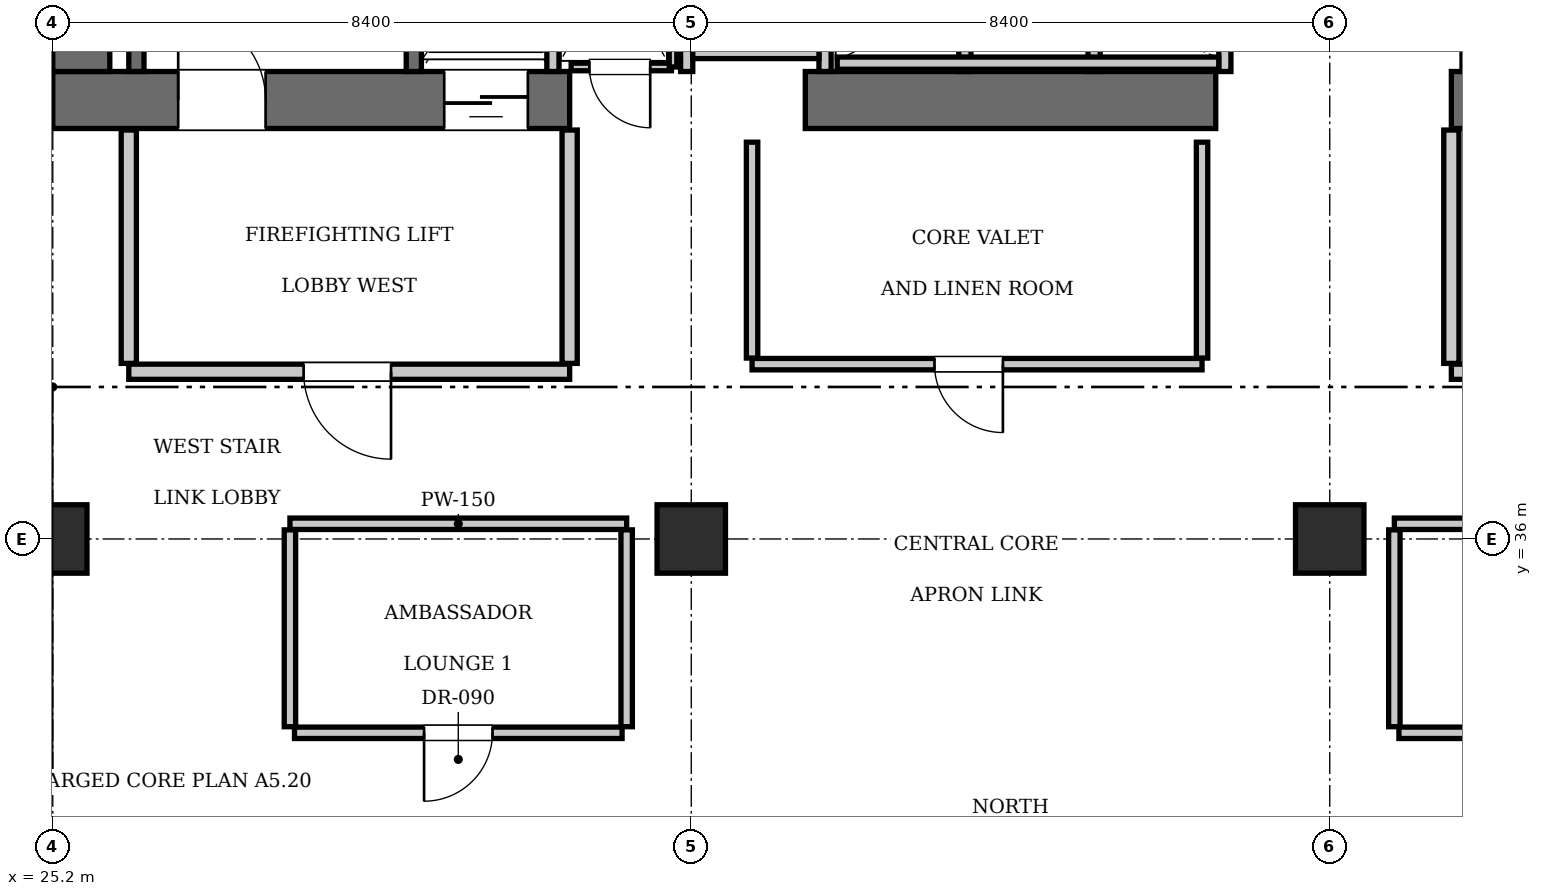
"""IFC4 building model, lengths in metres.
Left out: names, types, materials, properties, quantities, classifications, styles, units other than length and angle.
Written with IfcOpenShell. Run it as: python <this file> out.ifc"""

import sys

from ifc_helpers import new_model, si_unit, direction, frame, frame_2d, origin, origin_2d, place, context, subcontext, project, spatial, rectangle, extrude, element, fill, save


model = new_model("IFC4")
c1 = context("Model", 3, precision=1e-05, world=origin(), true_north=direction((0.0, 1.0)))
c2 = subcontext(c1, "Body", "Model", "MODEL_VIEW")
j1 = project(units=[si_unit("LENGTHUNIT", "METRE"), si_unit("PLANEANGLEUNIT", "RADIAN")], contexts=[c1])
p1 = place(None, origin())
s1 = spatial("IfcSite", under=j1, at=p1, CompositionType="ELEMENT")
p2 = place(p1, origin())
s2 = spatial("IfcBuilding", under=s1, at=p2, CompositionType="ELEMENT")
p3 = place(p2, frame((0.0, 0.0, 219.8)))
s3 = spatial("IfcBuildingStorey", under=s2, at=p3, CompositionType="ELEMENT", Elevation=219.8)
p4 = place(p3, frame((25.2, 41.775, 0.0), z_axis=(0.0, 0.0, 1.0), x_axis=(1.0, 0.0, 0.0)))
e1 = element("IfcWall", 1, at=p4, inside=s3, PredefinedType="SHEAR", context=c2, shape_type="SweptSolid", body=[
    extrude(rectangle(XDim=6.8, YDim=0.75, at=frame_2d((3.4, 0.0))), origin(), (0.0, 0.0, 1.0), 3.85),
])
p5 = place(p4, frame((1.65, 0.0, 0.0)))
e2 = element("IfcOpeningElement", 2, at=p5, cuts=e1, PredefinedType="OPENING", context=c2, shape_type="SweptSolid", body=[
    extrude(rectangle(XDim=1.15, YDim=2.15, at=frame_2d((0.575, 1.075))), frame((0.0, 0.385, 0.0), z_axis=(0.0, -1.0, 0.0), x_axis=(1.0, 0.0, 0.0)), (0.0, 0.0, 1.0), 0.77),
])
p6 = place(p4, frame((5.15, 0.0, 0.0)))
e3 = element("IfcOpeningElement", 3, at=p6, cuts=e1, PredefinedType="OPENING", context=c2, shape_type="SweptSolid", body=[
    extrude(rectangle(XDim=1.1, YDim=2.2, at=frame_2d((0.55, 1.1))), frame((0.0, 0.385, 0.0), z_axis=(0.0, -1.0, 0.0), x_axis=(1.0, 0.0, 0.0)), (0.0, 0.0, 1.0), 0.77),
])
p7 = place(p3, frame((35.1, 41.775, 0.0), z_axis=(0.0, 0.0, 1.0), x_axis=(1.0, 0.0, 0.0)))
e4 = element("IfcWall", 4, at=p7, inside=s3, PredefinedType="SHEAR", context=c2, shape_type="SweptSolid", body=[
    extrude(rectangle(XDim=5.4, YDim=0.75, at=frame_2d((2.7, 0.0))), origin(), (0.0, 0.0, 1.0), 3.85),
])
p8 = place(p3, frame((43.6, 41.775, 0.0), z_axis=(0.0, 0.0, 1.0), x_axis=(1.0, 0.0, 0.0)))
e5 = element("IfcWall", 5, at=p8, inside=s3, PredefinedType="SHEAR", context=c2, shape_type="SweptSolid", body=[
    extrude(rectangle(XDim=6.8, YDim=0.75, at=frame_2d((3.4, 0.0))), origin(), (0.0, 0.0, 1.0), 3.85),
])
p9 = place(p8, frame((3.9, 0.0, 0.0)))
e6 = element("IfcOpeningElement", 6, at=p9, cuts=e5, PredefinedType="OPENING", context=c2, shape_type="SweptSolid", body=[
    extrude(rectangle(XDim=1.15, YDim=2.15, at=frame_2d((0.575, 1.075))), frame((0.0, 0.385, 0.0), z_axis=(0.0, -1.0, 0.0), x_axis=(1.0, 0.0, 0.0)), (0.0, 0.0, 1.0), 0.77),
])
p10 = place(p8, frame((0.55, 0.0, 0.0)))
e7 = element("IfcOpeningElement", 7, at=p10, cuts=e5, PredefinedType="OPENING", context=c2, shape_type="SweptSolid", body=[
    extrude(rectangle(XDim=1.1, YDim=2.2, at=frame_2d((0.55, 1.1))), frame((0.0, 0.385, 0.0), z_axis=(0.0, -1.0, 0.0), x_axis=(1.0, 0.0, 0.0)), (0.0, 0.0, 1.0), 0.77),
])
p11 = place(p3, frame((25.575, 42.15, 0.0), z_axis=(0.0, 0.0, 1.0), x_axis=(0.0, 1.0, 0.0)))
e8 = element("IfcWall", 8, at=p11, inside=s3, PredefinedType="SHEAR", context=c2, shape_type="SweptSolid", body=[
    extrude(rectangle(XDim=1.9, YDim=0.75, at=frame_2d((0.95, 0.0))), origin(), (0.0, 0.0, 1.0), 3.85),
])
for number, where, z_axis, x_axis in (
    (9, (25.2, 36.0, 0.0), (0.0, 0.0, 1.0), (1.0, 0.0, 0.0)),
    (10, (33.6, 36.0, 0.0), (0.0, 0.0, 1.0), (1.0, 0.0, 0.0)),
    (11, (42.0, 36.0, 0.0), (0.0, 0.0, 1.0), (1.0, 0.0, 0.0)),
):
    element("IfcColumn", number, at=place(p3, frame(where, z_axis=z_axis, x_axis=x_axis)), inside=s3, PredefinedType="COLUMN", context=c2, shape_type="SweptSolid", body=[
        extrude(rectangle(XDim=0.9, YDim=0.9, at=origin_2d()), origin(), (0.0, 0.0, 1.0), 3.85),
    ])
p12 = place(p3, frame((29.95, 42.15, 0.0), z_axis=(0.0, 0.0, 1.0), x_axis=(0.0, 1.0, 0.0)))
e12 = element("IfcWall", 12, at=p12, inside=s3, PredefinedType="SOLIDWALL", context=c2, shape_type="SweptSolid", body=[
    extrude(rectangle(XDim=9.0, YDim=0.2, at=frame_2d((4.5, 0.0))), origin(), (0.0, 0.0, 1.0), 3.61),
])
p13 = place(p3, frame((26.3, 42.15, 0.0), z_axis=(0.0, 0.0, 1.0), x_axis=(0.0, 1.0, 0.0)))
e13 = element("IfcWall", 13, at=p13, inside=s3, PredefinedType="SOLIDWALL", context=c2, shape_type="SweptSolid", body=[
    extrude(rectangle(XDim=1.87, YDim=0.2, at=frame_2d((0.935, 0.0))), origin(), (0.0, 0.0, 1.0), 3.61),
])
for number, where, z_axis, x_axis in (
    (14, (31.78, 42.15, 0.0), (0.0, 0.0, 1.0), (0.0, 1.0, 0.0)),
    (15, (43.82, 42.15, 0.0), (0.0, 0.0, 1.0), (0.0, 1.0, 0.0)),
):
    element("IfcWall", number, at=place(p3, frame(where, z_axis=z_axis, x_axis=x_axis)), inside=s3, PredefinedType="SOLIDWALL", context=c2, shape_type="SweptSolid", body=[
        extrude(rectangle(XDim=2.59, YDim=0.16, at=frame_2d((1.295, 0.0))), origin(), (0.0, 0.0, 1.0), 3.61),
    ])
for number, where, z_axis, x_axis in (
    (16, (37.2, 42.15, 0.0), (0.0, 0.0, 1.0), (0.0, 1.0, 0.0)),
    (17, (38.9, 42.15, 0.0), (0.0, 0.0, 1.0), (0.0, 1.0, 0.0)),
    (18, (40.62, 42.15, 0.0), (0.0, 0.0, 1.0), (0.0, 1.0, 0.0)),
):
    element("IfcWall", number, at=place(p3, frame(where, z_axis=z_axis, x_axis=x_axis)), inside=s3, PredefinedType="SOLIDWALL", context=c2, shape_type="SweptSolid", body=[
        extrude(rectangle(XDim=2.2, YDim=0.16, at=frame_2d((1.1, 0.0))), origin(), (0.0, 0.0, 1.0), 3.61),
    ])
p14 = place(p3, frame((35.52, 42.26, 0.0), z_axis=(0.0, 0.0, 1.0), x_axis=(1.0, 0.0, 0.0)))
e19 = element("IfcWall", 19, at=p14, inside=s3, PredefinedType="SOLIDWALL", context=c2, shape_type="SweptSolid", body=[
    extrude(rectangle(XDim=5.02, YDim=0.16, at=frame_2d((2.51, 0.0))), origin(), (0.0, 0.0, 1.0), 3.61),
])
for number, where, z_axis, x_axis in (
    (20, (33.54, 42.15, 0.0), (0.0, 0.0, 1.0), (0.0, 1.0, 0.0)),
    (21, (35.36, 42.15, 0.0), (0.0, 0.0, 1.0), (0.0, 1.0, 0.0)),
):
    element("IfcWall", number, at=place(p3, frame(where, z_axis=z_axis, x_axis=x_axis)), inside=s3, PredefinedType="SOLIDWALL", context=c2, shape_type="SweptSolid", body=[
        extrude(rectangle(XDim=2.25, YDim=0.16, at=frame_2d((1.125, 0.0))), origin(), (0.0, 0.0, 1.0), 3.61),
    ])
p15 = place(p3, frame((33.62, 42.4, 0.0), z_axis=(0.0, 0.0, 1.0), x_axis=(1.0, 0.0, 0.0)))
e22 = element("IfcWall", 22, at=p15, inside=s3, PredefinedType="SOLIDWALL", context=c2, shape_type="SweptSolid", body=[
    extrude(rectangle(XDim=1.66, YDim=0.16, at=frame_2d((0.83, 0.0))), origin(), (0.0, 0.0, 1.0), 3.61),
])
p16 = place(p3, frame((26.2, 38.2, 0.0), z_axis=(0.0, 0.0, 1.0), x_axis=(1.0, 0.0, 0.0)))
e23 = element("IfcWall", 23, at=p16, inside=s3, PredefinedType="PARTITIONING", context=c2, shape_type="SweptSolid", body=[
    extrude(rectangle(XDim=5.8, YDim=0.2, at=frame_2d((2.9, 0.0))), origin(), (0.0, 0.0, 1.0), 3.61),
])
p17 = place(p16, frame((2.3, 0.0, 0.0)))
e24 = element("IfcOpeningElement", 24, at=p17, cuts=e23, PredefinedType="OPENING", context=c2, shape_type="SweptSolid", body=[
    extrude(rectangle(XDim=1.15, YDim=2.15, at=frame_2d((0.575, 1.075))), frame((0.0, 0.11, 0.0), z_axis=(0.0, -1.0, 0.0), x_axis=(1.0, 0.0, 0.0)), (0.0, 0.0, 1.0), 0.22),
])
for number, where, z_axis, x_axis in (
    (25, (26.2, 38.31, 0.0), (0.0, 0.0, 1.0), (0.0, 1.0, 0.0)),
    (26, (32.0, 38.31, 0.0), (0.0, 0.0, 1.0), (0.0, 1.0, 0.0)),
):
    element("IfcWall", number, at=place(p3, frame(where, z_axis=z_axis, x_axis=x_axis)), inside=s3, PredefinedType="PARTITIONING", context=c2, shape_type="SweptSolid", body=[
        extrude(rectangle(XDim=3.07, YDim=0.2, at=frame_2d((1.535, 0.0))), origin(), (0.0, 0.0, 1.0), 3.61),
    ])
p18 = place(p3, frame((43.6, 38.2, 0.0), z_axis=(0.0, 0.0, 1.0), x_axis=(1.0, 0.0, 0.0)))
e27 = element("IfcWall", 27, at=p18, inside=s3, PredefinedType="PARTITIONING", context=c2, shape_type="SweptSolid", body=[
    extrude(rectangle(XDim=5.8, YDim=0.2, at=frame_2d((2.9, 0.0))), origin(), (0.0, 0.0, 1.0), 3.61),
])
p19 = place(p18, frame((2.3, 0.0, 0.0)))
e28 = element("IfcOpeningElement", 28, at=p19, cuts=e27, PredefinedType="OPENING", context=c2, shape_type="SweptSolid", body=[
    extrude(rectangle(XDim=1.15, YDim=2.15, at=frame_2d((0.575, 1.075))), frame((0.0, 0.11, 0.0), z_axis=(0.0, -1.0, 0.0), x_axis=(1.0, 0.0, 0.0)), (0.0, 0.0, 1.0), 0.22),
])
p20 = place(p3, frame((43.6, 38.31, 0.0), z_axis=(0.0, 0.0, 1.0), x_axis=(0.0, 1.0, 0.0)))
e29 = element("IfcWall", 29, at=p20, inside=s3, PredefinedType="PARTITIONING", context=c2, shape_type="SweptSolid", body=[
    extrude(rectangle(XDim=3.07, YDim=0.2, at=frame_2d((1.535, 0.0))), origin(), (0.0, 0.0, 1.0), 3.61),
])
p21 = place(p3, frame((32.02, 42.21, 0.0), z_axis=(0.0, 0.0, 1.0), x_axis=(1.0, 0.0, 0.0)))
e30 = element("IfcWall", 30, at=p21, inside=s3, PredefinedType="PARTITIONING", context=c2, shape_type="SweptSolid", body=[
    extrude(rectangle(XDim=1.32, YDim=0.1, at=frame_2d((0.66, 0.0))), origin(), (0.0, 0.0, 1.0), 3.61),
])
p22 = place(p21, frame((0.24, 0.0, 0.0)))
e31 = element("IfcOpeningElement", 31, at=p22, cuts=e30, PredefinedType="OPENING", context=c2, shape_type="SweptSolid", body=[
    extrude(rectangle(XDim=0.8, YDim=2.05, at=frame_2d((0.4, 1.025))), frame((0.0, 0.06, 0.0), z_axis=(0.0, -1.0, 0.0), x_axis=(1.0, 0.0, 0.0)), (0.0, 0.0, 1.0), 0.12),
])
p23 = place(p3, frame((33.36, 42.21, 0.0), z_axis=(0.0, 0.0, 1.0), x_axis=(0.0, 1.0, 0.0)))
e32 = element("IfcWall", 32, at=p23, inside=s3, PredefinedType="PARTITIONING", context=c2, shape_type="SweptSolid", body=[
    extrude(rectangle(XDim=2.73, YDim=0.1, at=frame_2d((1.365, 0.0))), origin(), (0.0, 0.0, 1.0), 3.61),
])
p24 = place(p3, frame((34.4, 38.3, 0.0), z_axis=(0.0, 0.0, 1.0), x_axis=(1.0, 0.0, 0.0)))
e33 = element("IfcWall", 33, at=p24, inside=s3, PredefinedType="PARTITIONING", context=c2, shape_type="SweptSolid", body=[
    extrude(rectangle(XDim=5.92, YDim=0.15, at=frame_2d((2.96, 0.0))), origin(), (0.0, 0.0, 1.0), 3.61),
])
p25 = place(p24, frame((2.4, 0.0, 0.0)))
e34 = element("IfcOpeningElement", 34, at=p25, cuts=e33, PredefinedType="OPENING", context=c2, shape_type="SweptSolid", body=[
    extrude(rectangle(XDim=0.9, YDim=2.1, at=frame_2d((0.45, 1.05))), frame((0.0, 0.085, 0.0), z_axis=(0.0, -1.0, 0.0), x_axis=(1.0, 0.0, 0.0)), (0.0, 0.0, 1.0), 0.17),
])
for number, where, z_axis, x_axis in (
    (35, (34.4, 38.38, 0.0), (0.0, 0.0, 1.0), (0.0, 1.0, 0.0)),
    (36, (40.32, 38.38, 0.0), (0.0, 0.0, 1.0), (0.0, 1.0, 0.0)),
):
    element("IfcWall", number, at=place(p3, frame(where, z_axis=z_axis, x_axis=x_axis)), inside=s3, PredefinedType="PARTITIONING", context=c2, shape_type="SweptSolid", body=[
        extrude(rectangle(XDim=2.84, YDim=0.15, at=frame_2d((1.42, 0.0))), origin(), (0.0, 0.0, 1.0), 3.61),
    ])
p26 = place(p3, frame((28.32, 36.2, 0.0), z_axis=(0.0, 0.0, 1.0), x_axis=(1.0, 0.0, 0.0)))
e37 = element("IfcWall", 37, at=p26, inside=s3, PredefinedType="PARTITIONING", context=c2, shape_type="SweptSolid", body=[
    extrude(rectangle(XDim=4.43, YDim=0.15, at=frame_2d((2.215, 0.0))), origin(), (0.0, 0.0, 1.0), 3.61),
])
for number, where, z_axis, x_axis in (
    (38, (28.32, 33.53, 0.0), (0.0, 0.0, 1.0), (0.0, 1.0, 0.0)),
    (39, (32.75, 33.53, 0.0), (0.0, 0.0, 1.0), (0.0, 1.0, 0.0)),
):
    element("IfcWall", number, at=place(p3, frame(where, z_axis=z_axis, x_axis=x_axis)), inside=s3, PredefinedType="PARTITIONING", context=c2, shape_type="SweptSolid", body=[
        extrude(rectangle(XDim=2.59, YDim=0.15, at=frame_2d((1.295, 0.0))), origin(), (0.0, 0.0, 1.0), 3.61),
    ])
p27 = place(p3, frame((28.38, 33.45, 0.0), z_axis=(0.0, 0.0, 1.0), x_axis=(1.0, 0.0, 0.0)))
e40 = element("IfcWall", 40, at=p27, inside=s3, PredefinedType="PARTITIONING", context=c2, shape_type="SweptSolid", body=[
    extrude(rectangle(XDim=4.31, YDim=0.15, at=frame_2d((2.155, 0.0))), origin(), (0.0, 0.0, 1.0), 3.61),
])
p28 = place(p27, frame((1.705, 0.0, 0.0)))
e41 = element("IfcOpeningElement", 41, at=p28, cuts=e40, PredefinedType="OPENING", context=c2, shape_type="SweptSolid", body=[
    extrude(rectangle(XDim=0.9, YDim=2.1, at=frame_2d((0.45, 1.05))), frame((0.0, 0.085, 0.0), z_axis=(0.0, -1.0, 0.0), x_axis=(1.0, 0.0, 0.0)), (0.0, 0.0, 1.0), 0.17),
])
p29 = place(p3, frame((42.85, 36.2, 0.0), z_axis=(0.0, 0.0, 1.0), x_axis=(1.0, 0.0, 0.0)))
e42 = element("IfcWall", 42, at=p29, inside=s3, PredefinedType="PARTITIONING", context=c2, shape_type="SweptSolid", body=[
    extrude(rectangle(XDim=4.43, YDim=0.15, at=frame_2d((2.215, 0.0))), origin(), (0.0, 0.0, 1.0), 3.61),
])
p30 = place(p3, frame((42.85, 33.53, 0.0), z_axis=(0.0, 0.0, 1.0), x_axis=(0.0, 1.0, 0.0)))
e43 = element("IfcWall", 43, at=p30, inside=s3, PredefinedType="PARTITIONING", context=c2, shape_type="SweptSolid", body=[
    extrude(rectangle(XDim=2.59, YDim=0.15, at=frame_2d((1.295, 0.0))), origin(), (0.0, 0.0, 1.0), 3.61),
])
p31 = place(p3, frame((42.91, 33.45, 0.0), z_axis=(0.0, 0.0, 1.0), x_axis=(1.0, 0.0, 0.0)))
e44 = element("IfcWall", 44, at=p31, inside=s3, PredefinedType="PARTITIONING", context=c2, shape_type="SweptSolid", body=[
    extrude(rectangle(XDim=4.31, YDim=0.15, at=frame_2d((2.155, 0.0))), origin(), (0.0, 0.0, 1.0), 3.61),
])
p32 = place(p31, frame((1.705, 0.0, 0.0)))
e45 = element("IfcOpeningElement", 45, at=p32, cuts=e44, PredefinedType="OPENING", context=c2, shape_type="SweptSolid", body=[
    extrude(rectangle(XDim=0.9, YDim=2.1, at=frame_2d((0.45, 1.05))), frame((0.0, 0.085, 0.0), z_axis=(0.0, -1.0, 0.0), x_axis=(1.0, 0.0, 0.0)), (0.0, 0.0, 1.0), 0.17),
])
p33 = place(p5, origin())
e46 = element("IfcDoor", 46, at=p33, inside=s3, OperationType="SINGLE_SWING_LEFT", PredefinedType="DOOR", context=c2, shape_type="SweptSolid", body=[
    extrude(rectangle(XDim=1.15, YDim=2.15, at=frame_2d((0.575, 1.075))), frame((0.0, 0.025, 0.0), z_axis=(0.0, -1.0, 0.0), x_axis=(1.0, 0.0, 0.0)), (0.0, 0.0, 1.0), 0.05),
])
fill(e2, e46)
p34 = place(p6, frame((1.1, 0.0, 0.0), z_axis=(0.0, 0.0, 1.0), x_axis=(-1.0, 0.0, 0.0)))
e47 = element("IfcDoor", 47, at=p34, inside=s3, OperationType="SLIDING_TO_LEFT", PredefinedType="DOOR", context=c2, shape_type="SweptSolid", body=[
    extrude(rectangle(XDim=1.1, YDim=2.2, at=frame_2d((0.55, 1.1))), frame((0.0, 0.025, 0.0), z_axis=(0.0, -1.0, 0.0), x_axis=(1.0, 0.0, 0.0)), (0.0, 0.0, 1.0), 0.05),
])
fill(e3, e47)
p35 = place(p17, frame((1.15, 0.0, 0.0), z_axis=(0.0, 0.0, 1.0), x_axis=(-1.0, 0.0, 0.0)))
e48 = element("IfcDoor", 48, at=p35, inside=s3, OperationType="SINGLE_SWING_LEFT", PredefinedType="DOOR", context=c2, shape_type="SweptSolid", body=[
    extrude(rectangle(XDim=1.15, YDim=2.15, at=frame_2d((0.575, 1.075))), frame((0.0, 0.025, 0.0), z_axis=(0.0, -1.0, 0.0), x_axis=(1.0, 0.0, 0.0)), (0.0, 0.0, 1.0), 0.05),
])
fill(e24, e48)
p36 = place(p22, frame((0.8, 0.0, 0.0), z_axis=(0.0, 0.0, 1.0), x_axis=(-1.0, 0.0, 0.0)))
e49 = element("IfcDoor", 49, at=p36, inside=s3, OperationType="SINGLE_SWING_LEFT", PredefinedType="DOOR", context=c2, shape_type="SweptSolid", body=[
    extrude(rectangle(XDim=0.8, YDim=2.05, at=frame_2d((0.4, 1.025))), frame((0.0, 0.025, 0.0), z_axis=(0.0, -1.0, 0.0), x_axis=(1.0, 0.0, 0.0)), (0.0, 0.0, 1.0), 0.05),
])
fill(e31, e49)
p37 = place(p25, frame((0.9, 0.0, 0.0), z_axis=(0.0, 0.0, 1.0), x_axis=(-1.0, 0.0, 0.0)))
e50 = element("IfcDoor", 50, at=p37, inside=s3, OperationType="SINGLE_SWING_LEFT", PredefinedType="DOOR", context=c2, shape_type="SweptSolid", body=[
    extrude(rectangle(XDim=0.9, YDim=2.1, at=frame_2d((0.45, 1.05))), frame((0.0, 0.025, 0.0), z_axis=(0.0, -1.0, 0.0), x_axis=(1.0, 0.0, 0.0)), (0.0, 0.0, 1.0), 0.05),
])
fill(e34, e50)
p38 = place(p28, frame((0.9, 0.0, 0.0), z_axis=(0.0, 0.0, 1.0), x_axis=(-1.0, 0.0, 0.0)))
e51 = element("IfcDoor", 51, at=p38, inside=s3, OperationType="SINGLE_SWING_RIGHT", PredefinedType="DOOR", context=c2, shape_type="SweptSolid", body=[
    extrude(rectangle(XDim=0.9, YDim=2.1, at=frame_2d((0.45, 1.05))), frame((0.0, 0.025, 0.0), z_axis=(0.0, -1.0, 0.0), x_axis=(1.0, 0.0, 0.0)), (0.0, 0.0, 1.0), 0.05),
])
fill(e41, e51)
save(model, sys.argv[1])
